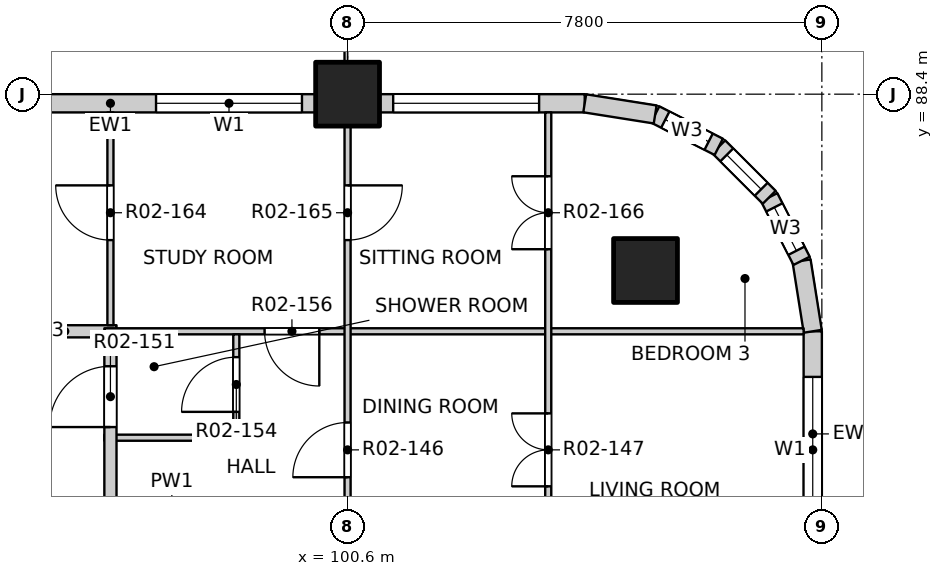
"""IFC4 building model, lengths in metres.
Left out: names, types, materials, properties, quantities, classifications, styles, units other than length and angle.
Written with IfcOpenShell. Run it as: python <this file> out.ifc"""

import sys

from ifc_helpers import new_model, si_unit, direction, frame, frame_2d, origin, origin_2d, place, context, subcontext, project, spatial, rectangle, extrude, element, fill, save


model = new_model("IFC4")
c1 = context("Model", 3, precision=1e-05, world=origin(), true_north=direction((0.0, 1.0)))
c2 = subcontext(c1, "Body", "Model", "MODEL_VIEW")
j1 = project(units=[si_unit("LENGTHUNIT", "METRE"), si_unit("PLANEANGLEUNIT", "RADIAN")], contexts=[c1])
p1 = place(None, origin())
s1 = spatial("IfcSite", under=j1, at=p1, CompositionType="ELEMENT")
p2 = place(p1, origin())
s2 = spatial("IfcBuilding", under=s1, at=p2, CompositionType="ELEMENT")
p3 = place(p2, frame((0.0, 0.0, 29.7)))
s3 = spatial("IfcBuildingStorey", under=s2, at=p3, CompositionType="ELEMENT", Elevation=29.7)
for number, where, z_axis, x_axis in (
    (1, (105.5, 85.5, -0.25), (0.0, 0.0, 1.0), (1.0, 0.0, 0.0)),
    (2, (100.6, 88.4, -0.25), (0.0, 0.0, 1.0), (1.0, 0.0, 0.0)),
):
    element("IfcColumn", number, at=place(p3, frame(where, z_axis=z_axis, x_axis=x_axis)), inside=s3, PredefinedType="COLUMN", context=c2, shape_type="SweptSolid", body=[
        extrude(rectangle(XDim=1.05, YDim=1.05, at=origin_2d()), origin(), (0.0, 0.0, 1.0), 3.4),
    ])
p4 = place(p3, frame((108.25, 81.125, 0.0), z_axis=(0.0, 0.0, 1.0), x_axis=(0.0, 1.0, 0.0)))
e3 = element("IfcWall", 3, at=p4, inside=s3, PredefinedType="SOLIDWALL", context=c2, shape_type="SweptSolid", body=[
    extrude(rectangle(XDim=3.375, YDim=0.3, at=frame_2d((1.688, 0.0))), origin(), (0.0, 0.0, 1.0), 2.7),
])
p5 = place(p4, frame((0.225, 0.0, 0.9)))
e4 = element("IfcOpeningElement", 4, at=p5, cuts=e3, PredefinedType="OPENING", context=c2, shape_type="SweptSolid", body=[
    extrude(rectangle(XDim=2.4, YDim=1.8, at=frame_2d((1.2, 0.9))), frame((0.0, 0.16, 0.0), z_axis=(0.0, -1.0, 0.0), x_axis=(1.0, 0.0, 0.0)), (0.0, 0.0, 1.0), 0.32),
])
p6 = place(p3, frame((93.325, 88.25, 0.0), z_axis=(0.0, 0.0, 1.0), x_axis=(1.0, 0.0, 0.0)))
e5 = element("IfcWall", 5, at=p6, inside=s3, PredefinedType="SOLIDWALL", context=c2, shape_type="SweptSolid", body=[
    extrude(rectangle(XDim=6.75, YDim=0.3, at=frame_2d((3.375, 0.0))), origin(), (0.0, 0.0, 1.0), 2.7),
])
p7 = place(p6, frame((0.525, 0.0, 0.0)))
e6 = element("IfcOpeningElement", 6, at=p7, cuts=e5, PredefinedType="OPENING", context=c2, shape_type="SweptSolid", body=[
    extrude(rectangle(XDim=1.8, YDim=2.4, at=frame_2d((0.9, 1.2))), frame((0.0, 0.16, 0.0), z_axis=(0.0, -1.0, 0.0), x_axis=(1.0, 0.0, 0.0)), (0.0, 0.0, 1.0), 0.32),
])
p8 = place(p6, frame((4.125, 0.0, 0.9)))
e7 = element("IfcOpeningElement", 7, at=p8, cuts=e5, PredefinedType="OPENING", context=c2, shape_type="SweptSolid", body=[
    extrude(rectangle(XDim=2.4, YDim=1.8, at=frame_2d((1.2, 0.9))), frame((0.0, 0.16, 0.0), z_axis=(0.0, -1.0, 0.0), x_axis=(1.0, 0.0, 0.0)), (0.0, 0.0, 1.0), 0.32),
])
p9 = place(p3, frame((101.125, 88.25, 0.0), z_axis=(0.0, 0.0, 1.0), x_axis=(1.0, 0.0, 0.0)))
e8 = element("IfcWall", 8, at=p9, inside=s3, PredefinedType="SOLIDWALL", context=c2, shape_type="SweptSolid", body=[
    extrude(rectangle(XDim=3.375, YDim=0.3, at=frame_2d((1.688, 0.0))), origin(), (0.0, 0.0, 1.0), 2.7),
])
p10 = place(p9, frame((0.225, 0.0, 0.9)))
e9 = element("IfcOpeningElement", 9, at=p10, cuts=e8, PredefinedType="OPENING", context=c2, shape_type="SweptSolid", body=[
    extrude(rectangle(XDim=2.4, YDim=1.8, at=frame_2d((1.2, 0.9))), frame((0.0, 0.16, 0.0), z_axis=(0.0, -1.0, 0.0), x_axis=(1.0, 0.0, 0.0)), (0.0, 0.0, 1.0), 0.32),
])
p11 = place(p3, frame((108.25, 84.5, 0.0), z_axis=(0.0, 0.0, 1.0), x_axis=(-0.156496880861, 0.987678452879, 0.0)))
e10 = element("IfcWall", 10, at=p11, inside=s3, PredefinedType="SOLIDWALL", context=c2, shape_type="SweptSolid", body=[
    extrude(rectangle(XDim=1.173, YDim=0.3, at=frame_2d((0.586, 0.0))), origin(), (0.0, 0.0, 1.0), 2.7),
])
p12 = place(p3, frame((108.066, 85.659, 0.0), z_axis=(0.0, 0.0, 1.0), x_axis=(-0.454025524128, 0.890988677504, 0.0)))
e11 = element("IfcWall", 11, at=p12, inside=s3, PredefinedType="SOLIDWALL", context=c2, shape_type="SweptSolid", body=[
    extrude(rectangle(XDim=1.173, YDim=0.3, at=frame_2d((0.587, 0.0))), origin(), (0.0, 0.0, 1.0), 2.7),
])
p13 = place(p12, frame((0.187, 0.0, 0.9)))
e12 = element("IfcOpeningElement", 12, at=p13, cuts=e11, PredefinedType="OPENING", context=c2, shape_type="SweptSolid", body=[
    extrude(rectangle(XDim=0.8, YDim=1.2, at=frame_2d((0.4, 0.6))), frame((0.0, 0.16, 0.0), z_axis=(0.0, -1.0, 0.0), x_axis=(1.0, 0.0, 0.0)), (0.0, 0.0, 1.0), 0.32),
])
p14 = place(p3, frame((107.534, 86.704, 0.0), z_axis=(0.0, 0.0, 1.0), x_axis=(-0.707106781187, 0.707106781187, 0.0)))
e13 = element("IfcWall", 13, at=p14, inside=s3, PredefinedType="SOLIDWALL", context=c2, shape_type="SweptSolid", body=[
    extrude(rectangle(XDim=1.173, YDim=0.3, at=frame_2d((0.586, 0.0))), origin(), (0.0, 0.0, 1.0), 2.7),
])
p15 = place(p14, frame((0.187, 0.0, 0.9)))
e14 = element("IfcOpeningElement", 14, at=p15, cuts=e13, PredefinedType="OPENING", context=c2, shape_type="SweptSolid", body=[
    extrude(rectangle(XDim=0.8, YDim=1.2, at=frame_2d((0.4, 0.6))), frame((0.0, 0.16, 0.0), z_axis=(0.0, -1.0, 0.0), x_axis=(1.0, 0.0, 0.0)), (0.0, 0.0, 1.0), 0.32),
])
p16 = place(p3, frame((106.704, 87.534, 0.0), z_axis=(0.0, 0.0, 1.0), x_axis=(-0.890988677504, 0.454025524128, 0.0)))
e15 = element("IfcWall", 15, at=p16, inside=s3, PredefinedType="SOLIDWALL", context=c2, shape_type="SweptSolid", body=[
    extrude(rectangle(XDim=1.173, YDim=0.3, at=frame_2d((0.587, 0.0))), origin(), (0.0, 0.0, 1.0), 2.7),
])
p17 = place(p16, frame((0.187, 0.0, 0.9)))
e16 = element("IfcOpeningElement", 16, at=p17, cuts=e15, PredefinedType="OPENING", context=c2, shape_type="SweptSolid", body=[
    extrude(rectangle(XDim=0.8, YDim=1.2, at=frame_2d((0.4, 0.6))), frame((0.0, 0.16, 0.0), z_axis=(0.0, -1.0, 0.0), x_axis=(1.0, 0.0, 0.0)), (0.0, 0.0, 1.0), 0.32),
])
p18 = place(p3, frame((105.659, 88.066, 0.0), z_axis=(0.0, 0.0, 1.0), x_axis=(-0.987678452879, 0.156496880861, 0.0)))
e17 = element("IfcWall", 17, at=p18, inside=s3, PredefinedType="SOLIDWALL", context=c2, shape_type="SweptSolid", body=[
    extrude(rectangle(XDim=1.173, YDim=0.3, at=frame_2d((0.586, 0.0))), origin(), (0.0, 0.0, 1.0), 2.7),
])
p19 = place(p3, frame((96.6, 82.75, 0.0), z_axis=(0.0, 0.0, 1.0), x_axis=(1.0, 0.0, 0.0)))
e18 = element("IfcWall", 18, at=p19, inside=s3, PredefinedType="PARTITIONING", context=c2, shape_type="SweptSolid", body=[
    extrude(rectangle(XDim=2.22, YDim=0.1, at=frame_2d((1.11, 0.0))), origin(), (0.0, 0.0, 1.0), 3.15),
])
p20 = place(p3, frame((95.1, 84.5, 0.0), z_axis=(0.0, 0.0, 1.0), x_axis=(1.0, 0.0, 0.0)))
e19 = element("IfcWall", 19, at=p20, inside=s3, PredefinedType="PARTITIONING", context=c2, shape_type="SweptSolid", body=[
    extrude(rectangle(XDim=1.7, YDim=0.2, at=frame_2d((0.85, 0.0))), origin(), (0.0, 0.0, 1.0), 3.15),
])
p21 = place(p3, frame((96.6, 84.5, 0.0), z_axis=(0.0, 0.0, 1.0), x_axis=(1.0, 0.0, 0.0)))
e20 = element("IfcWall", 20, at=p21, inside=s3, PredefinedType="PARTITIONING", context=c2, shape_type="SweptSolid", body=[
    extrude(rectangle(XDim=11.5, YDim=0.1, at=frame_2d((5.75, 0.0))), origin(), (0.0, 0.0, 1.0), 3.15),
])
p22 = place(p21, frame((2.635, 0.0, 0.0)))
e21 = element("IfcOpeningElement", 21, at=p22, cuts=e20, PredefinedType="OPENING", context=c2, shape_type="SweptSolid", body=[
    extrude(rectangle(XDim=0.9, YDim=2.1, at=frame_2d((0.45, 1.05))), frame((0.0, 0.06, 0.0), z_axis=(0.0, -1.0, 0.0), x_axis=(1.0, 0.0, 0.0)), (0.0, 0.0, 1.0), 0.12),
])
p23 = place(p3, frame((96.7, 53.4, 0.0), z_axis=(0.0, 0.0, 1.0), x_axis=(0.0, 1.0, 0.0)))
e22 = element("IfcWall", 22, at=p23, inside=s3, PredefinedType="PARTITIONING", context=c2, shape_type="SweptSolid", body=[
    extrude(rectangle(XDim=31.0, YDim=0.2, at=frame_2d((15.5, 0.0))), origin(), (0.0, 0.0, 1.0), 3.15),
])
p24 = place(p23, frame((2.425, 0.0, 0.0)))
e23 = element("IfcOpeningElement", 23, at=p24, cuts=e22, PredefinedType="OPENING", context=c2, shape_type="SweptSolid", body=[
    extrude(rectangle(XDim=1.0, YDim=2.1, at=frame_2d((0.5, 1.05))), frame((0.0, 0.11, 0.0), z_axis=(0.0, -1.0, 0.0), x_axis=(1.0, 0.0, 0.0)), (0.0, 0.0, 1.0), 0.22),
])
p25 = place(p23, frame((13.375, 0.0, 0.0)))
e24 = element("IfcOpeningElement", 24, at=p25, cuts=e22, PredefinedType="OPENING", context=c2, shape_type="SweptSolid", body=[
    extrude(rectangle(XDim=1.0, YDim=2.1, at=frame_2d((0.5, 1.05))), frame((0.0, 0.11, 0.0), z_axis=(0.0, -1.0, 0.0), x_axis=(1.0, 0.0, 0.0)), (0.0, 0.0, 1.0), 0.22),
])
p26 = place(p23, frame((29.525, 0.0, 0.0)))
e25 = element("IfcOpeningElement", 25, at=p26, cuts=e22, PredefinedType="OPENING", context=c2, shape_type="SweptSolid", body=[
    extrude(rectangle(XDim=1.0, YDim=2.1, at=frame_2d((0.5, 1.05))), frame((0.0, 0.11, 0.0), z_axis=(0.0, -1.0, 0.0), x_axis=(1.0, 0.0, 0.0)), (0.0, 0.0, 1.0), 0.22),
])
p27 = place(p3, frame((96.7, 84.6, 0.0), z_axis=(0.0, 0.0, 1.0), x_axis=(0.0, 1.0, 0.0)))
e26 = element("IfcWall", 26, at=p27, inside=s3, PredefinedType="PARTITIONING", context=c2, shape_type="SweptSolid", body=[
    extrude(rectangle(XDim=3.5, YDim=0.1, at=frame_2d((1.75, 0.0))), origin(), (0.0, 0.0, 1.0), 3.15),
])
p28 = place(p27, frame((1.4, 0.0, 0.0)))
e27 = element("IfcOpeningElement", 27, at=p28, cuts=e26, PredefinedType="OPENING", context=c2, shape_type="SweptSolid", body=[
    extrude(rectangle(XDim=0.9, YDim=2.1, at=frame_2d((0.45, 1.05))), frame((0.0, 0.06, 0.0), z_axis=(0.0, -1.0, 0.0), x_axis=(1.0, 0.0, 0.0)), (0.0, 0.0, 1.0), 0.12),
])
p29 = place(p3, frame((98.77, 82.8, 0.0), z_axis=(0.0, 0.0, 1.0), x_axis=(0.0, 1.0, 0.0)))
e28 = element("IfcWall", 28, at=p29, inside=s3, PredefinedType="PARTITIONING", context=c2, shape_type="SweptSolid", body=[
    extrude(rectangle(XDim=1.65, YDim=0.1, at=frame_2d((0.825, 0.0))), origin(), (0.0, 0.0, 1.0), 3.15),
])
p30 = place(p29, frame((0.375, 0.0, 0.0)))
e29 = element("IfcOpeningElement", 29, at=p30, cuts=e28, PredefinedType="OPENING", context=c2, shape_type="SweptSolid", body=[
    extrude(rectangle(XDim=0.9, YDim=2.1, at=frame_2d((0.45, 1.05))), frame((0.0, 0.06, 0.0), z_axis=(0.0, -1.0, 0.0), x_axis=(1.0, 0.0, 0.0)), (0.0, 0.0, 1.0), 0.12),
])
p31 = place(p3, frame((100.6, 80.6, 0.0), z_axis=(0.0, 0.0, 1.0), x_axis=(0.0, 1.0, 0.0)))
e30 = element("IfcWall", 30, at=p31, inside=s3, PredefinedType="PARTITIONING", context=c2, shape_type="SweptSolid", body=[
    extrude(rectangle(XDim=7.5, YDim=0.1, at=frame_2d((3.75, 0.0))), origin(), (0.0, 0.0, 1.0), 2.55),
])
p32 = place(p31, frame((1.5, 0.0, 0.0)))
e31 = element("IfcOpeningElement", 31, at=p32, cuts=e30, PredefinedType="OPENING", context=c2, shape_type="SweptSolid", body=[
    extrude(rectangle(XDim=0.9, YDim=2.1, at=frame_2d((0.45, 1.05))), frame((0.0, 0.06, 0.0), z_axis=(0.0, -1.0, 0.0), x_axis=(1.0, 0.0, 0.0)), (0.0, 0.0, 1.0), 0.12),
])
p33 = place(p31, frame((5.4, 0.0, 0.0)))
e32 = element("IfcOpeningElement", 32, at=p33, cuts=e30, PredefinedType="OPENING", context=c2, shape_type="SweptSolid", body=[
    extrude(rectangle(XDim=0.9, YDim=2.1, at=frame_2d((0.45, 1.05))), frame((0.0, 0.06, 0.0), z_axis=(0.0, -1.0, 0.0), x_axis=(1.0, 0.0, 0.0)), (0.0, 0.0, 1.0), 0.12),
])
p34 = place(p3, frame((103.9, 72.9, 0.0), z_axis=(0.0, 0.0, 1.0), x_axis=(0.0, 1.0, 0.0)))
e33 = element("IfcWall", 33, at=p34, inside=s3, PredefinedType="PARTITIONING", context=c2, shape_type="SweptSolid", body=[
    extrude(rectangle(XDim=15.2, YDim=0.1, at=frame_2d((7.6, 0.0))), origin(), (0.0, 0.0, 1.0), 3.15),
])
p35 = place(p34, frame((0.425, 0.0, 0.0)))
e34 = element("IfcOpeningElement", 34, at=p35, cuts=e33, PredefinedType="OPENING", context=c2, shape_type="SweptSolid", body=[
    extrude(rectangle(XDim=0.9, YDim=2.1, at=frame_2d((0.45, 1.05))), frame((0.0, 0.06, 0.0), z_axis=(0.0, -1.0, 0.0), x_axis=(1.0, 0.0, 0.0)), (0.0, 0.0, 1.0), 0.12),
])
p36 = place(p34, frame((2.375, 0.0, 0.0)))
e35 = element("IfcOpeningElement", 35, at=p36, cuts=e33, PredefinedType="OPENING", context=c2, shape_type="SweptSolid", body=[
    extrude(rectangle(XDim=0.9, YDim=2.1, at=frame_2d((0.45, 1.05))), frame((0.0, 0.06, 0.0), z_axis=(0.0, -1.0, 0.0), x_axis=(1.0, 0.0, 0.0)), (0.0, 0.0, 1.0), 0.12),
])
p37 = place(p34, frame((4.325, 0.0, 0.0)))
e36 = element("IfcOpeningElement", 36, at=p37, cuts=e33, PredefinedType="OPENING", context=c2, shape_type="SweptSolid", body=[
    extrude(rectangle(XDim=0.9, YDim=2.1, at=frame_2d((0.45, 1.05))), frame((0.0, 0.06, 0.0), z_axis=(0.0, -1.0, 0.0), x_axis=(1.0, 0.0, 0.0)), (0.0, 0.0, 1.0), 0.12),
])
p38 = place(p34, frame((6.275, 0.0, 0.0)))
e37 = element("IfcOpeningElement", 37, at=p38, cuts=e33, PredefinedType="OPENING", context=c2, shape_type="SweptSolid", body=[
    extrude(rectangle(XDim=0.9, YDim=2.1, at=frame_2d((0.45, 1.05))), frame((0.0, 0.06, 0.0), z_axis=(0.0, -1.0, 0.0), x_axis=(1.0, 0.0, 0.0)), (0.0, 0.0, 1.0), 0.12),
])
p39 = place(p34, frame((9.05, 0.0, 0.0)))
e38 = element("IfcOpeningElement", 38, at=p39, cuts=e33, PredefinedType="OPENING", context=c2, shape_type="SweptSolid", body=[
    extrude(rectangle(XDim=1.2, YDim=2.1, at=frame_2d((0.6, 1.05))), frame((0.0, 0.06, 0.0), z_axis=(0.0, -1.0, 0.0), x_axis=(1.0, 0.0, 0.0)), (0.0, 0.0, 1.0), 0.12),
])
p40 = place(p34, frame((12.95, 0.0, 0.0)))
e39 = element("IfcOpeningElement", 39, at=p40, cuts=e33, PredefinedType="OPENING", context=c2, shape_type="SweptSolid", body=[
    extrude(rectangle(XDim=1.2, YDim=2.1, at=frame_2d((0.6, 1.05))), frame((0.0, 0.06, 0.0), z_axis=(0.0, -1.0, 0.0), x_axis=(1.0, 0.0, 0.0)), (0.0, 0.0, 1.0), 0.12),
])
p41 = place(p5, origin())
e40 = element("IfcWindow", 40, at=p41, inside=s3, PartitioningType="DOUBLE_PANEL_VERTICAL", PredefinedType="WINDOW", context=c2, shape_type="SweptSolid", body=[
    extrude(rectangle(XDim=2.4, YDim=1.8, at=frame_2d((1.2, 0.9))), frame((0.0, 0.03, 0.0), z_axis=(0.0, -1.0, 0.0), x_axis=(1.0, 0.0, 0.0)), (0.0, 0.0, 1.0), 0.06),
])
fill(e4, e40)
p42 = place(p8, origin())
e41 = element("IfcWindow", 41, at=p42, inside=s3, PartitioningType="DOUBLE_PANEL_VERTICAL", PredefinedType="WINDOW", context=c2, shape_type="SweptSolid", body=[
    extrude(rectangle(XDim=2.4, YDim=1.8, at=frame_2d((1.2, 0.9))), frame((0.0, 0.03, 0.0), z_axis=(0.0, -1.0, 0.0), x_axis=(1.0, 0.0, 0.0)), (0.0, 0.0, 1.0), 0.06),
])
fill(e7, e41)
p43 = place(p10, origin())
e42 = element("IfcWindow", 42, at=p43, inside=s3, PartitioningType="DOUBLE_PANEL_VERTICAL", PredefinedType="WINDOW", context=c2, shape_type="SweptSolid", body=[
    extrude(rectangle(XDim=2.4, YDim=1.8, at=frame_2d((1.2, 0.9))), frame((0.0, 0.03, 0.0), z_axis=(0.0, -1.0, 0.0), x_axis=(1.0, 0.0, 0.0)), (0.0, 0.0, 1.0), 0.06),
])
fill(e9, e42)
p44 = place(p13, origin())
e43 = element("IfcWindow", 43, at=p44, inside=s3, PartitioningType="SINGLE_PANEL", PredefinedType="WINDOW", context=c2, shape_type="SweptSolid", body=[
    extrude(rectangle(XDim=0.8, YDim=1.2, at=frame_2d((0.4, 0.6))), frame((0.0, 0.03, 0.0), z_axis=(0.0, -1.0, 0.0), x_axis=(1.0, 0.0, 0.0)), (0.0, 0.0, 1.0), 0.06),
])
fill(e12, e43)
p45 = place(p15, origin())
e44 = element("IfcWindow", 44, at=p45, inside=s3, PartitioningType="SINGLE_PANEL", PredefinedType="WINDOW", context=c2, shape_type="SweptSolid", body=[
    extrude(rectangle(XDim=0.8, YDim=1.2, at=frame_2d((0.4, 0.6))), frame((0.0, 0.03, 0.0), z_axis=(0.0, -1.0, 0.0), x_axis=(1.0, 0.0, 0.0)), (0.0, 0.0, 1.0), 0.06),
])
fill(e14, e44)
p46 = place(p17, origin())
e45 = element("IfcWindow", 45, at=p46, inside=s3, PartitioningType="SINGLE_PANEL", PredefinedType="WINDOW", context=c2, shape_type="SweptSolid", body=[
    extrude(rectangle(XDim=0.8, YDim=1.2, at=frame_2d((0.4, 0.6))), frame((0.0, 0.03, 0.0), z_axis=(0.0, -1.0, 0.0), x_axis=(1.0, 0.0, 0.0)), (0.0, 0.0, 1.0), 0.06),
])
fill(e16, e45)
p47 = place(p32, origin())
e46 = element("IfcDoor", 46, at=p47, inside=s3, OperationType="SINGLE_SWING_LEFT", PredefinedType="DOOR", context=c2, shape_type="SweptSolid", body=[
    extrude(rectangle(XDim=0.9, YDim=2.1, at=frame_2d((0.45, 1.05))), frame((0.0, 0.025, 0.0), z_axis=(0.0, -1.0, 0.0), x_axis=(1.0, 0.0, 0.0)), (0.0, 0.0, 1.0), 0.05),
])
fill(e31, e46)
p48 = place(p39, origin())
e47 = element("IfcDoor", 47, at=p48, inside=s3, OperationType="DOUBLE_DOOR_SINGLE_SWING", PredefinedType="DOOR", context=c2, shape_type="SweptSolid", body=[
    extrude(rectangle(XDim=1.2, YDim=2.1, at=frame_2d((0.6, 1.05))), frame((0.0, 0.025, 0.0), z_axis=(0.0, -1.0, 0.0), x_axis=(1.0, 0.0, 0.0)), (0.0, 0.0, 1.0), 0.05),
])
fill(e38, e47)
p49 = place(p26, origin())
e48 = element("IfcDoor", 48, at=p49, inside=s3, OperationType="SINGLE_SWING_LEFT", PredefinedType="DOOR", context=c2, shape_type="SweptSolid", body=[
    extrude(rectangle(XDim=1.0, YDim=2.1, at=frame_2d((0.5, 1.05))), frame((0.0, 0.025, 0.0), z_axis=(0.0, -1.0, 0.0), x_axis=(1.0, 0.0, 0.0)), (0.0, 0.0, 1.0), 0.05),
])
fill(e25, e48)
p50 = place(p30, origin())
e49 = element("IfcDoor", 49, at=p50, inside=s3, OperationType="SINGLE_SWING_LEFT", PredefinedType="DOOR", context=c2, shape_type="SweptSolid", body=[
    extrude(rectangle(XDim=0.9, YDim=2.1, at=frame_2d((0.45, 1.05))), frame((0.0, 0.025, 0.0), z_axis=(0.0, -1.0, 0.0), x_axis=(1.0, 0.0, 0.0)), (0.0, 0.0, 1.0), 0.05),
])
fill(e29, e49)
p51 = place(p22, origin())
e50 = element("IfcDoor", 50, at=p51, inside=s3, OperationType="SINGLE_SWING_LEFT", PredefinedType="DOOR", context=c2, shape_type="SweptSolid", body=[
    extrude(rectangle(XDim=0.9, YDim=2.1, at=frame_2d((0.45, 1.05))), frame((0.0, 0.025, 0.0), z_axis=(0.0, -1.0, 0.0), x_axis=(1.0, 0.0, 0.0)), (0.0, 0.0, 1.0), 0.05),
])
fill(e21, e50)
p52 = place(p28, origin())
e51 = element("IfcDoor", 51, at=p52, inside=s3, OperationType="SINGLE_SWING_RIGHT", PredefinedType="DOOR", context=c2, shape_type="SweptSolid", body=[
    extrude(rectangle(XDim=0.9, YDim=2.1, at=frame_2d((0.45, 1.05))), frame((0.0, 0.025, 0.0), z_axis=(0.0, -1.0, 0.0), x_axis=(1.0, 0.0, 0.0)), (0.0, 0.0, 1.0), 0.05),
])
fill(e27, e51)
p53 = place(p33, origin())
e52 = element("IfcDoor", 52, at=p53, inside=s3, OperationType="SINGLE_SWING_LEFT", PredefinedType="DOOR", context=c2, shape_type="SweptSolid", body=[
    extrude(rectangle(XDim=0.9, YDim=2.1, at=frame_2d((0.45, 1.05))), frame((0.0, 0.025, 0.0), z_axis=(0.0, -1.0, 0.0), x_axis=(1.0, 0.0, 0.0)), (0.0, 0.0, 1.0), 0.05),
])
fill(e32, e52)
p54 = place(p40, origin())
e53 = element("IfcDoor", 53, at=p54, inside=s3, OperationType="DOUBLE_DOOR_SINGLE_SWING", PredefinedType="DOOR", context=c2, shape_type="SweptSolid", body=[
    extrude(rectangle(XDim=1.2, YDim=2.1, at=frame_2d((0.6, 1.05))), frame((0.0, 0.025, 0.0), z_axis=(0.0, -1.0, 0.0), x_axis=(1.0, 0.0, 0.0)), (0.0, 0.0, 1.0), 0.05),
])
fill(e39, e53)
save(model, sys.argv[1])
